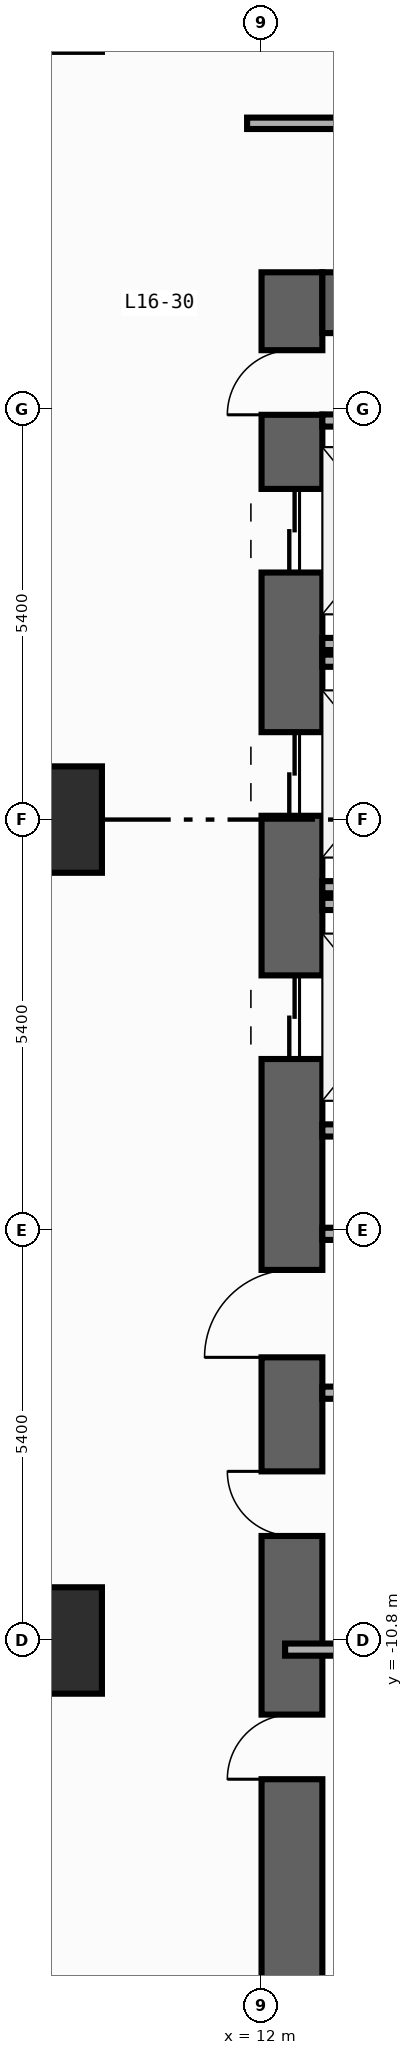
"""IFC4 building model, lengths in metres.
Left out: names, types, materials, properties, quantities, classifications, styles, units other than length and angle.
Written with IfcOpenShell. Run it as: python <this file> out.ifc"""

import sys

from ifc_helpers import new_model, si_unit, direction, frame, frame_2d, origin, origin_2d, place, context, subcontext, project, spatial, rectangle, extrude, element, fill, save


model = new_model("IFC4")
c1 = context("Model", 3, precision=1e-05, world=origin(), true_north=direction((0.0, 1.0)))
c2 = subcontext(c1, "Body", "Model", "MODEL_VIEW")
j1 = project(units=[si_unit("LENGTHUNIT", "METRE"), si_unit("PLANEANGLEUNIT", "RADIAN")], contexts=[c1])
p1 = place(None, origin())
s1 = spatial("IfcSite", under=j1, at=p1, CompositionType="ELEMENT")
p2 = place(p1, origin())
s2 = spatial("IfcBuilding", under=s1, at=p2, CompositionType="ELEMENT")
p3 = place(p2, frame((0.0, 0.0, 68.0)))
s3 = spatial("IfcBuildingStorey", under=s2, at=p3, CompositionType="ELEMENT", Elevation=68.0)
p4 = place(p3, frame((12.4, -19.8, 0.0), z_axis=(0.0, 0.0, 1.0), x_axis=(0.0, 1.0, 0.0)))
e1 = element("IfcWall", 1, at=p4, inside=s3, PredefinedType="SHEAR", context=c2, shape_type="SweptSolid", body=[
    extrude(rectangle(XDim=27.0, YDim=0.8, at=frame_2d((13.5, 0.0))), origin(), (0.0, 0.0, 1.0), 3.94),
])
p5 = place(p4, frame((23.05, 0.0, 0.0)))
e2 = element("IfcOpeningElement", 2, at=p5, cuts=e1, PredefinedType="OPENING", context=c2, shape_type="SweptSolid", body=[
    extrude(rectangle(XDim=1.1, YDim=2.2, at=frame_2d((0.55, 1.1))), frame((0.0, 0.41, 0.0), z_axis=(0.0, -1.0, 0.0), x_axis=(1.0, 0.0, 0.0)), (0.0, 0.0, 1.0), 0.82),
])
p6 = place(p4, frame((19.85, 0.0, 0.0)))
e3 = element("IfcOpeningElement", 3, at=p6, cuts=e1, PredefinedType="OPENING", context=c2, shape_type="SweptSolid", body=[
    extrude(rectangle(XDim=1.1, YDim=2.2, at=frame_2d((0.55, 1.1))), frame((0.0, 0.41, 0.0), z_axis=(0.0, -1.0, 0.0), x_axis=(1.0, 0.0, 0.0)), (0.0, 0.0, 1.0), 0.82),
])
p7 = place(p4, frame((16.65, 0.0, 0.0)))
e4 = element("IfcOpeningElement", 4, at=p7, cuts=e1, PredefinedType="OPENING", context=c2, shape_type="SweptSolid", body=[
    extrude(rectangle(XDim=1.1, YDim=2.2, at=frame_2d((0.55, 1.1))), frame((0.0, 0.41, 0.0), z_axis=(0.0, -1.0, 0.0), x_axis=(1.0, 0.0, 0.0)), (0.0, 0.0, 1.0), 0.82),
])
p8 = place(p4, frame((7.175, 0.0, 0.0)))
e5 = element("IfcOpeningElement", 5, at=p8, cuts=e1, PredefinedType="OPENING", context=c2, shape_type="SweptSolid", body=[
    extrude(rectangle(XDim=0.85, YDim=2.1, at=frame_2d((0.425, 1.05))), frame((0.0, 0.41, 0.0), z_axis=(0.0, -1.0, 0.0), x_axis=(1.0, 0.0, 0.0)), (0.0, 0.0, 1.0), 0.82),
])
p9 = place(p4, frame((10.375, 0.0, 0.0)))
e6 = element("IfcOpeningElement", 6, at=p9, cuts=e1, PredefinedType="OPENING", context=c2, shape_type="SweptSolid", body=[
    extrude(rectangle(XDim=0.85, YDim=2.1, at=frame_2d((0.425, 1.05))), frame((0.0, 0.41, 0.0), z_axis=(0.0, -1.0, 0.0), x_axis=(1.0, 0.0, 0.0)), (0.0, 0.0, 1.0), 0.82),
])
p10 = place(p4, frame((12.725, 0.0, 0.0)))
e7 = element("IfcOpeningElement", 7, at=p10, cuts=e1, PredefinedType="OPENING", context=c2, shape_type="SweptSolid", body=[
    extrude(rectangle(XDim=1.15, YDim=2.2, at=frame_2d((0.575, 1.1))), frame((0.0, 0.41, 0.0), z_axis=(0.0, -1.0, 0.0), x_axis=(1.0, 0.0, 0.0)), (0.0, 0.0, 1.0), 0.82),
])
p11 = place(p4, frame((25.125, 0.0, 0.0)))
e8 = element("IfcOpeningElement", 8, at=p11, cuts=e1, PredefinedType="OPENING", context=c2, shape_type="SweptSolid", body=[
    extrude(rectangle(XDim=0.85, YDim=2.1, at=frame_2d((0.425, 1.05))), frame((0.0, 0.41, 0.0), z_axis=(0.0, -1.0, 0.0), x_axis=(1.0, 0.0, 0.0)), (0.0, 0.0, 1.0), 0.82),
])
p12 = place(p3, frame((12.8, 6.8, 0.0), z_axis=(0.0, 0.0, 1.0), x_axis=(1.0, 0.0, 0.0)))
e9 = element("IfcWall", 9, at=p12, inside=s3, PredefinedType="SHEAR", context=c2, shape_type="SweptSolid", body=[
    extrude(rectangle(XDim=6.8, YDim=0.8, at=frame_2d((3.4, 0.0))), origin(), (0.0, 0.0, 1.0), 3.94),
])
for number, where, z_axis, x_axis in (
    (10, (9.2, -10.8, 0.0), (0.0, 0.0, 1.0), (1.0, 0.0, 0.0)),
    (11, (9.2, 0.0, 0.0), (0.0, 0.0, 1.0), (1.0, 0.0, 0.0)),
):
    element("IfcColumn", number, at=place(p3, frame(where, z_axis=z_axis, x_axis=x_axis)), inside=s3, PredefinedType="COLUMN", context=c2, shape_type="SweptSolid", body=[
        extrude(rectangle(XDim=1.4, YDim=1.4, at=origin_2d()), origin(), (0.0, 0.0, 1.0), 4.2),
    ])
for number, where, z_axis, x_axis in (
    (12, (12.8, 2.31, 0.0), (0.0, 0.0, 1.0), (1.0, 0.0, 0.0)),
    (13, (12.8, -0.89, 0.0), (0.0, 0.0, 1.0), (1.0, 0.0, 0.0)),
    (14, (12.8, 2.09, 0.0), (0.0, 0.0, 1.0), (1.0, 0.0, 0.0)),
    (15, (12.8, -4.09, 0.0), (0.0, 0.0, 1.0), (1.0, 0.0, 0.0)),
    (16, (12.8, -1.11, 0.0), (0.0, 0.0, 1.0), (1.0, 0.0, 0.0)),
):
    element("IfcWall", number, at=place(p3, frame(where, z_axis=z_axis, x_axis=x_axis)), inside=s3, PredefinedType="STANDARD", context=c2, shape_type="SweptSolid", body=[
        extrude(rectangle(XDim=2.19, YDim=0.16, at=frame_2d((1.095, 0.0))), origin(), (0.0, 0.0, 1.0), 3.94),
    ])
for number, where, z_axis, x_axis in (
    (17, (12.8, -5.45, 0.0), (0.0, 0.0, 1.0), (1.0, 0.0, 0.0)),
    (18, (12.8, -7.54, 0.0), (0.0, 0.0, 1.0), (1.0, 0.0, 0.0)),
    (19, (12.8, 5.25, 0.0), (0.0, 0.0, 1.0), (1.0, 0.0, 0.0)),
):
    element("IfcWall", number, at=place(p3, frame(where, z_axis=z_axis, x_axis=x_axis)), inside=s3, PredefinedType="STANDARD", context=c2, shape_type="SweptSolid", body=[
        extrude(rectangle(XDim=2.6, YDim=0.16, at=frame_2d((1.3, 0.0))), origin(), (0.0, 0.0, 1.0), 3.94),
    ])
p13 = place(p3, frame((12.31, -10.92, 0.0), z_axis=(0.0, 0.0, 1.0), x_axis=(1.0, 0.0, 0.0)))
e20 = element("IfcWall", 20, at=p13, inside=s3, PredefinedType="PARTITIONING", context=c2, shape_type="SweptSolid", body=[
    extrude(rectangle(XDim=3.065, YDim=0.16, at=frame_2d((1.532, 0.0))), origin(), (0.0, 0.0, 1.0), 3.14),
])
p14 = place(p3, frame((11.81, 9.16, 0.0), z_axis=(0.0, 0.0, 1.0), x_axis=(1.0, 0.0, 0.0)))
e21 = element("IfcWall", 21, at=p14, inside=s3, PredefinedType="PARTITIONING", context=c2, shape_type="SweptSolid", body=[
    extrude(rectangle(XDim=8.83, YDim=0.15, at=frame_2d((4.415, 0.0))), origin(), (0.0, 0.0, 1.0), 3.94),
])
p15 = place(p14, frame((5.067, 0.0, 0.0)))
e22 = element("IfcOpeningElement", 22, at=p15, cuts=e21, PredefinedType="OPENING", context=c2, shape_type="SweptSolid", body=[
    extrude(rectangle(XDim=0.9, YDim=2.15, at=frame_2d((0.45, 1.075))), frame((0.0, 0.085, 0.0), z_axis=(0.0, -1.0, 0.0), x_axis=(1.0, 0.0, 0.0)), (0.0, 0.0, 1.0), 0.17),
])
p16 = place(p5, origin())
e23 = element("IfcDoor", 23, at=p16, inside=s3, OperationType="DOUBLE_DOOR_SLIDING", PredefinedType="DOOR", context=c2, shape_type="SweptSolid", body=[
    extrude(rectangle(XDim=1.1, YDim=2.2, at=frame_2d((0.55, 1.1))), frame((0.0, 0.025, 0.0), z_axis=(0.0, -1.0, 0.0), x_axis=(1.0, 0.0, 0.0)), (0.0, 0.0, 1.0), 0.05),
])
fill(e2, e23)
p17 = place(p6, origin())
e24 = element("IfcDoor", 24, at=p17, inside=s3, OperationType="DOUBLE_DOOR_SLIDING", PredefinedType="DOOR", context=c2, shape_type="SweptSolid", body=[
    extrude(rectangle(XDim=1.1, YDim=2.2, at=frame_2d((0.55, 1.1))), frame((0.0, 0.025, 0.0), z_axis=(0.0, -1.0, 0.0), x_axis=(1.0, 0.0, 0.0)), (0.0, 0.0, 1.0), 0.05),
])
fill(e3, e24)
p18 = place(p7, origin())
e25 = element("IfcDoor", 25, at=p18, inside=s3, OperationType="DOUBLE_DOOR_SLIDING", PredefinedType="DOOR", context=c2, shape_type="SweptSolid", body=[
    extrude(rectangle(XDim=1.1, YDim=2.2, at=frame_2d((0.55, 1.1))), frame((0.0, 0.025, 0.0), z_axis=(0.0, -1.0, 0.0), x_axis=(1.0, 0.0, 0.0)), (0.0, 0.0, 1.0), 0.05),
])
fill(e4, e25)
p19 = place(p8, origin())
e26 = element("IfcDoor", 26, at=p19, inside=s3, OperationType="SINGLE_SWING_LEFT", PredefinedType="DOOR", context=c2, shape_type="SweptSolid", body=[
    extrude(rectangle(XDim=0.85, YDim=2.1, at=frame_2d((0.425, 1.05))), frame((0.0, 0.025, 0.0), z_axis=(0.0, -1.0, 0.0), x_axis=(1.0, 0.0, 0.0)), (0.0, 0.0, 1.0), 0.05),
])
fill(e5, e26)
p20 = place(p9, origin())
e27 = element("IfcDoor", 27, at=p20, inside=s3, OperationType="SINGLE_SWING_RIGHT", PredefinedType="DOOR", context=c2, shape_type="SweptSolid", body=[
    extrude(rectangle(XDim=0.85, YDim=2.1, at=frame_2d((0.425, 1.05))), frame((0.0, 0.025, 0.0), z_axis=(0.0, -1.0, 0.0), x_axis=(1.0, 0.0, 0.0)), (0.0, 0.0, 1.0), 0.05),
])
fill(e6, e27)
p21 = place(p10, origin())
e28 = element("IfcDoor", 28, at=p21, inside=s3, OperationType="SINGLE_SWING_LEFT", PredefinedType="DOOR", context=c2, shape_type="SweptSolid", body=[
    extrude(rectangle(XDim=1.15, YDim=2.2, at=frame_2d((0.575, 1.1))), frame((0.0, 0.025, 0.0), z_axis=(0.0, -1.0, 0.0), x_axis=(1.0, 0.0, 0.0)), (0.0, 0.0, 1.0), 0.05),
])
fill(e7, e28)
p22 = place(p11, origin())
e29 = element("IfcDoor", 29, at=p22, inside=s3, OperationType="SINGLE_SWING_LEFT", PredefinedType="DOOR", context=c2, shape_type="SweptSolid", body=[
    extrude(rectangle(XDim=0.85, YDim=2.1, at=frame_2d((0.425, 1.05))), frame((0.0, 0.025, 0.0), z_axis=(0.0, -1.0, 0.0), x_axis=(1.0, 0.0, 0.0)), (0.0, 0.0, 1.0), 0.05),
])
fill(e8, e29)
save(model, sys.argv[1])
